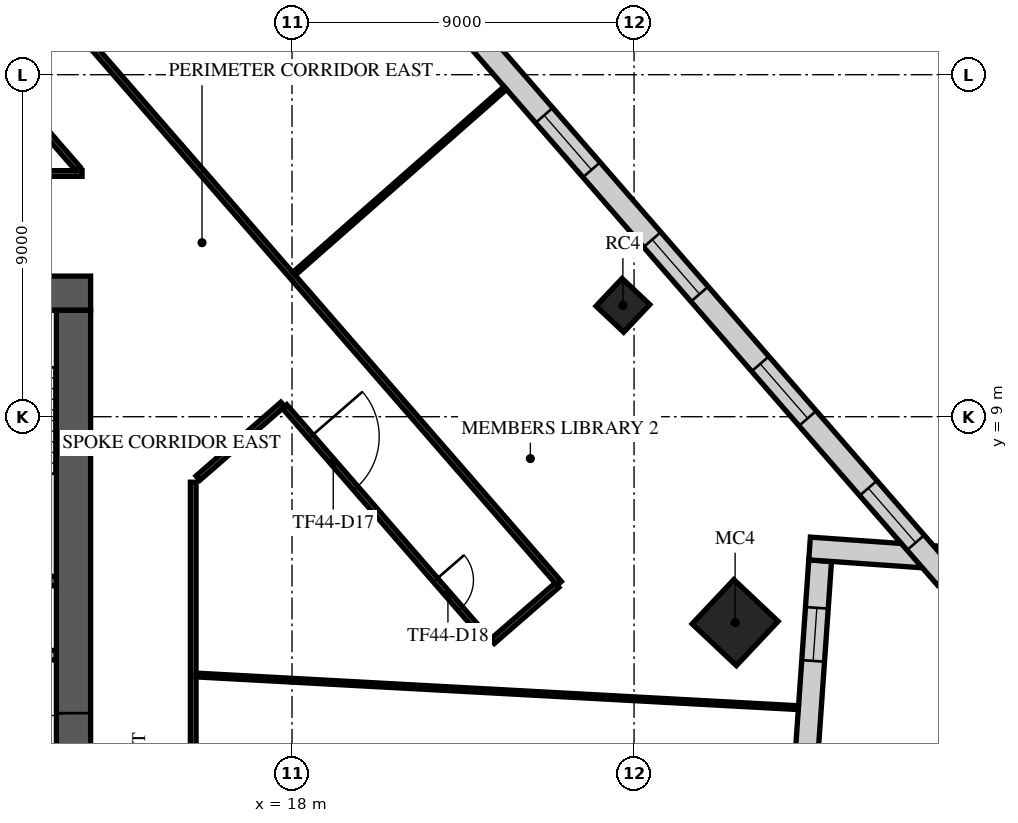
"""IFC4 building model, lengths in metres.
Left out: names, types, materials, properties, quantities, classifications, styles, units other than length and angle.
Written with IfcOpenShell. Run it as: python <this file> out.ifc"""

import sys

from ifc_helpers import new_model, si_unit, direction, frame, frame_2d, origin, origin_2d, place, context, subcontext, project, spatial, rectangle, extrude, element, fill, save


model = new_model("IFC4")
c1 = context("Model", 3, precision=1e-05, world=origin(), true_north=direction((0.0, 1.0)))
c2 = subcontext(c1, "Body", "Model", "MODEL_VIEW")
j1 = project(units=[si_unit("LENGTHUNIT", "METRE"), si_unit("PLANEANGLEUNIT", "RADIAN")], contexts=[c1])
p1 = place(None, origin())
s1 = spatial("IfcSite", under=j1, at=p1, CompositionType="ELEMENT")
p2 = place(p1, origin())
s2 = spatial("IfcBuilding", under=s1, at=p2, CompositionType="ELEMENT")
p3 = place(p2, frame((0.0, 0.0, 189.3)))
s3 = spatial("IfcBuildingStorey", under=s2, at=p3, CompositionType="ELEMENT", Elevation=189.3)
p4 = place(p3, frame((29.659, 3.582, -0.38), z_axis=(0.0, 0.0, 1.0), x_axis=(0.685916152371, 0.727680583715, 0.0)))
e1 = element("IfcColumn", 1, at=p4, inside=s3, PredefinedType="COLUMN", context=c2, shape_type="SweptSolid", body=[
    extrude(rectangle(XDim=1.6, YDim=1.6, at=origin_2d()), origin(), (0.0, 0.0, 1.0), 4.38),
])
p5 = place(p3, frame((26.706, 11.931, -0.38), z_axis=(0.0, 0.0, 1.0), x_axis=(0.685916152371, 0.727680583715, 0.0)))
e2 = element("IfcColumn", 2, at=p5, inside=s3, PredefinedType="COLUMN", context=c2, shape_type="SweptSolid", body=[
    extrude(rectangle(XDim=1.0, YDim=1.0, at=origin_2d()), origin(), (0.0, 0.0, 1.0), 4.38),
])
p6 = place(p3, frame((-12.7, 12.25, 0.0), z_axis=(0.0, 0.0, 1.0), x_axis=(1.0, 0.0, 0.0)))
e3 = element("IfcWall", 3, at=p6, inside=s3, PredefinedType="SHEAR", context=c2, shape_type="SweptSolid", body=[
    extrude(rectangle(XDim=25.4, YDim=0.9, at=frame_2d((12.7, 0.0))), origin(), (0.0, 0.0, 1.0), 3.62),
])
p7 = place(p6, frame((11.5, 0.0, 0.0)))
e4 = element("IfcOpeningElement", 4, at=p7, cuts=e3, PredefinedType="OPENING", context=c2, shape_type="SweptSolid", body=[
    extrude(rectangle(XDim=2.4, YDim=2.4, at=frame_2d((1.2, 1.2))), frame((0.0, 0.46, 0.0), z_axis=(0.0, -1.0, 0.0), x_axis=(1.0, 0.0, 0.0)), (0.0, 0.0, 1.0), 0.92),
])
p8 = place(p6, frame((22.325, 0.0, 0.0)))
e5 = element("IfcOpeningElement", 5, at=p8, cuts=e3, PredefinedType="OPENING", context=c2, shape_type="SweptSolid", body=[
    extrude(rectangle(XDim=1.2, YDim=2.1, at=frame_2d((0.6, 1.05))), frame((0.0, 0.46, 0.0), z_axis=(0.0, -1.0, 0.0), x_axis=(1.0, 0.0, 0.0)), (0.0, 0.0, 1.0), 0.92),
])
p9 = place(p6, frame((1.3, 0.0, 0.0)))
e6 = element("IfcOpeningElement", 6, at=p9, cuts=e3, PredefinedType="OPENING", context=c2, shape_type="SweptSolid", body=[
    extrude(rectangle(XDim=1.0, YDim=2.1, at=frame_2d((0.5, 1.05))), frame((0.0, 0.46, 0.0), z_axis=(0.0, -1.0, 0.0), x_axis=(1.0, 0.0, 0.0)), (0.0, 0.0, 1.0), 0.92),
])
p10 = place(p3, frame((12.25, -11.8, 0.0), z_axis=(0.0, 0.0, 1.0), x_axis=(0.0, 1.0, 0.0)))
e7 = element("IfcWall", 7, at=p10, inside=s3, PredefinedType="SHEAR", context=c2, shape_type="SweptSolid", body=[
    extrude(rectangle(XDim=23.6, YDim=0.9, at=frame_2d((11.8, 0.0))), origin(), (0.0, 0.0, 1.0), 3.62),
])
p11 = place(p10, frame((10.6, 0.0, 0.0)))
e8 = element("IfcOpeningElement", 8, at=p11, cuts=e7, PredefinedType="OPENING", context=c2, shape_type="SweptSolid", body=[
    extrude(rectangle(XDim=2.4, YDim=2.4, at=frame_2d((1.2, 1.2))), frame((0.0, 0.46, 0.0), z_axis=(0.0, -1.0, 0.0), x_axis=(1.0, 0.0, 0.0)), (0.0, 0.0, 1.0), 0.92),
])
p12 = place(p3, frame((8.65, 4.675, 0.0), z_axis=(0.0, 0.0, 1.0), x_axis=(1.0, 0.0, 0.0)))
e9 = element("IfcWall", 9, at=p12, inside=s3, PredefinedType="SOLIDWALL", context=c2, shape_type="SweptSolid", body=[
    extrude(rectangle(XDim=3.15, YDim=0.25, at=frame_2d((1.575, 0.0))), origin(), (0.0, 0.0, 1.0), 3.62),
])
p13 = place(p3, frame((8.38, 2.725, 0.0), z_axis=(0.0, 0.0, 1.0), x_axis=(1.0, 0.0, 0.0)))
e10 = element("IfcWall", 10, at=p13, inside=s3, PredefinedType="PARTITIONING", context=c2, shape_type="SweptSolid", body=[
    extrude(rectangle(XDim=3.415, YDim=0.25, at=frame_2d((1.708, 0.0))), origin(), (0.0, 0.0, 1.0), 3.62),
])
p14 = place(p13, frame((1.17, 0.0, 0.0)))
e11 = element("IfcOpeningElement", 11, at=p14, cuts=e10, PredefinedType="OPENING", context=c2, shape_type="SweptSolid", body=[
    extrude(rectangle(XDim=0.9, YDim=2.1, at=frame_2d((0.45, 1.05))), frame((0.0, 0.135, 0.0), z_axis=(0.0, -1.0, 0.0), x_axis=(1.0, 0.0, 0.0)), (0.0, 0.0, 1.0), 0.27),
])
p15 = place(p3, frame((31.354, -2.547, 0.0), z_axis=(0.0, 0.0, 1.0), x_axis=(0.069743544409, 0.997564954283, 0.0)))
e12 = element("IfcWall", 12, at=p15, inside=s3, PredefinedType="STANDARD", context=c2, shape_type="SweptSolid", body=[
    extrude(rectangle(XDim=7.778, YDim=0.6, at=frame_2d((3.889, 0.0))), origin(), (0.0, 0.0, 1.0), 3.62),
])
p16 = place(p15, frame((1.244, 0.0, 0.9)))
e13 = element("IfcOpeningElement", 13, at=p16, cuts=e12, PredefinedType="OPENING", context=c2, shape_type="SweptSolid", body=[
    extrude(rectangle(XDim=1.4, YDim=2.1, at=frame_2d((0.7, 1.05))), frame((0.0, 0.31, 0.0), z_axis=(0.0, -1.0, 0.0), x_axis=(1.0, 0.0, 0.0)), (0.0, 0.0, 1.0), 0.62),
])
p17 = place(p15, frame((5.134, 0.0, 0.9)))
e14 = element("IfcOpeningElement", 14, at=p17, cuts=e12, PredefinedType="OPENING", context=c2, shape_type="SweptSolid", body=[
    extrude(rectangle(XDim=1.4, YDim=2.1, at=frame_2d((0.7, 1.05))), frame((0.0, 0.31, 0.0), z_axis=(0.0, -1.0, 0.0), x_axis=(1.0, 0.0, 0.0)), (0.0, 0.0, 1.0), 0.62),
])
p18 = place(p3, frame((31.618, 5.532, 0.0), z_axis=(0.0, 0.0, 1.0), x_axis=(0.997563916762, -0.069758382828, 0.0)))
e15 = element("IfcWall", 15, at=p18, inside=s3, PredefinedType="STANDARD", context=c2, shape_type="SweptSolid", body=[
    extrude(rectangle(XDim=3.846, YDim=0.6, at=frame_2d((1.923, 0.0))), origin(), (0.0, 0.0, 1.0), 3.62),
])
p19 = place(p3, frame((35.208, 4.768, 0.0), z_axis=(0.0, 0.0, 1.0), x_axis=(-0.656058749455, 0.754709823219, 0.0)))
e16 = element("IfcWall", 16, at=p19, inside=s3, PredefinedType="STANDARD", context=c2, shape_type="SweptSolid", body=[
    extrude(rectangle(XDim=39.0, YDim=0.6, at=frame_2d((19.5, 0.0))), origin(), (0.0, 0.0, 1.0), 3.62),
])
p20 = place(p19, frame((1.217, 0.0, 0.9)))
e17 = element("IfcOpeningElement", 17, at=p20, cuts=e16, PredefinedType="OPENING", context=c2, shape_type="SweptSolid", body=[
    extrude(rectangle(XDim=1.9, YDim=2.1, at=frame_2d((0.95, 1.05))), frame((0.0, 0.31, 0.0), z_axis=(0.0, -1.0, 0.0), x_axis=(1.0, 0.0, 0.0)), (0.0, 0.0, 1.0), 0.62),
])
p21 = place(p19, frame((5.55, 0.0, 0.9)))
e18 = element("IfcOpeningElement", 18, at=p21, cuts=e16, PredefinedType="OPENING", context=c2, shape_type="SweptSolid", body=[
    extrude(rectangle(XDim=1.9, YDim=2.1, at=frame_2d((0.95, 1.05))), frame((0.0, 0.31, 0.0), z_axis=(0.0, -1.0, 0.0), x_axis=(1.0, 0.0, 0.0)), (0.0, 0.0, 1.0), 0.62),
])
p22 = place(p19, frame((9.883, 0.0, 0.9)))
e19 = element("IfcOpeningElement", 19, at=p22, cuts=e16, PredefinedType="OPENING", context=c2, shape_type="SweptSolid", body=[
    extrude(rectangle(XDim=1.9, YDim=2.1, at=frame_2d((0.95, 1.05))), frame((0.0, 0.31, 0.0), z_axis=(0.0, -1.0, 0.0), x_axis=(1.0, 0.0, 0.0)), (0.0, 0.0, 1.0), 0.62),
])
p23 = place(p19, frame((14.217, 0.0, 0.9)))
e20 = element("IfcOpeningElement", 20, at=p23, cuts=e16, PredefinedType="OPENING", context=c2, shape_type="SweptSolid", body=[
    extrude(rectangle(XDim=1.9, YDim=2.1, at=frame_2d((0.95, 1.05))), frame((0.0, 0.31, 0.0), z_axis=(0.0, -1.0, 0.0), x_axis=(1.0, 0.0, 0.0)), (0.0, 0.0, 1.0), 0.62),
])
p24 = place(p19, frame((18.55, 0.0, 0.9)))
e21 = element("IfcOpeningElement", 21, at=p24, cuts=e16, PredefinedType="OPENING", context=c2, shape_type="SweptSolid", body=[
    extrude(rectangle(XDim=1.9, YDim=2.1, at=frame_2d((0.95, 1.05))), frame((0.0, 0.31, 0.0), z_axis=(0.0, -1.0, 0.0), x_axis=(1.0, 0.0, 0.0)), (0.0, 0.0, 1.0), 0.62),
])
p25 = place(p19, frame((22.883, 0.0, 0.9)))
e22 = element("IfcOpeningElement", 22, at=p25, cuts=e16, PredefinedType="OPENING", context=c2, shape_type="SweptSolid", body=[
    extrude(rectangle(XDim=1.9, YDim=2.1, at=frame_2d((0.95, 1.05))), frame((0.0, 0.31, 0.0), z_axis=(0.0, -1.0, 0.0), x_axis=(1.0, 0.0, 0.0)), (0.0, 0.0, 1.0), 0.62),
])
p26 = place(p19, frame((27.217, 0.0, 0.9)))
e23 = element("IfcOpeningElement", 23, at=p26, cuts=e16, PredefinedType="OPENING", context=c2, shape_type="SweptSolid", body=[
    extrude(rectangle(XDim=1.9, YDim=2.1, at=frame_2d((0.95, 1.05))), frame((0.0, 0.31, 0.0), z_axis=(0.0, -1.0, 0.0), x_axis=(1.0, 0.0, 0.0)), (0.0, 0.0, 1.0), 0.62),
])
p27 = place(p19, frame((31.55, 0.0, 0.9)))
e24 = element("IfcOpeningElement", 24, at=p27, cuts=e16, PredefinedType="OPENING", context=c2, shape_type="SweptSolid", body=[
    extrude(rectangle(XDim=1.9, YDim=2.1, at=frame_2d((0.95, 1.05))), frame((0.0, 0.31, 0.0), z_axis=(0.0, -1.0, 0.0), x_axis=(1.0, 0.0, 0.0)), (0.0, 0.0, 1.0), 0.62),
])
p28 = place(p19, frame((35.883, 0.0, 0.9)))
e25 = element("IfcOpeningElement", 25, at=p28, cuts=e16, PredefinedType="OPENING", context=c2, shape_type="SweptSolid", body=[
    extrude(rectangle(XDim=1.9, YDim=2.1, at=frame_2d((0.95, 1.05))), frame((0.0, 0.31, 0.0), z_axis=(0.0, -1.0, 0.0), x_axis=(1.0, 0.0, 0.0)), (0.0, 0.0, 1.0), 0.62),
])
p29 = place(p3, frame((-7.843, 15.4, 0.0), z_axis=(0.0, 0.0, 1.0), x_axis=(1.0, 0.0, 0.0)))
e26 = element("IfcWall", 26, at=p29, inside=s3, PredefinedType="PARTITIONING", context=c2, shape_type="SweptSolid", body=[
    extrude(rectangle(XDim=20.318, YDim=0.15, at=frame_2d((10.159, 0.0))), origin(), (0.0, 0.0, 1.0), 3.17),
])
p30 = place(p29, frame((9.55, 0.0, 0.0)))
e27 = element("IfcOpeningElement", 27, at=p30, cuts=e26, PredefinedType="OPENING", context=c2, shape_type="SweptSolid", body=[
    extrude(rectangle(XDim=1.0, YDim=2.1, at=frame_2d((0.5, 1.05))), frame((0.0, 0.085, 0.0), z_axis=(0.0, -1.0, 0.0), x_axis=(1.0, 0.0, 0.0)), (0.0, 0.0, 1.0), 0.17),
])
p31 = place(p3, frame((6.292, 22.512, 0.0), z_axis=(0.0, 0.0, 1.0), x_axis=(0.656052066859, -0.754715632255, 0.0)))
e28 = element("IfcWall", 28, at=p31, inside=s3, PredefinedType="PARTITIONING", context=c2, shape_type="SweptSolid", body=[
    extrude(rectangle(XDim=9.26, YDim=0.15, at=frame_2d((4.63, 0.0))), origin(), (0.0, 0.0, 1.0), 3.17),
])
p32 = place(p31, frame((3.963, 0.0, 0.0)))
e29 = element("IfcOpeningElement", 29, at=p32, cuts=e28, PredefinedType="OPENING", context=c2, shape_type="SweptSolid", body=[
    extrude(rectangle(XDim=1.0, YDim=2.1, at=frame_2d((0.5, 1.05))), frame((0.0, 0.085, 0.0), z_axis=(0.0, -1.0, 0.0), x_axis=(1.0, 0.0, 0.0)), (0.0, 0.0, 1.0), 0.17),
])
p33 = place(p3, frame((8.103, 24.087, 0.0), z_axis=(0.0, 0.0, 1.0), x_axis=(0.656048444225, -0.754718781289, 0.0)))
e30 = element("IfcWall", 30, at=p33, inside=s3, PredefinedType="PARTITIONING", context=c2, shape_type="SweptSolid", body=[
    extrude(rectangle(XDim=25.8, YDim=0.15, at=frame_2d((12.9, 0.0))), origin(), (0.0, 0.0, 1.0), 3.17),
])
p34 = place(p3, frame((15.4, -8.667, 0.0), z_axis=(0.0, 0.0, 1.0), x_axis=(0.0, 1.0, 0.0)))
e31 = element("IfcWall", 31, at=p34, inside=s3, PredefinedType="PARTITIONING", context=c2, shape_type="SweptSolid", body=[
    extrude(rectangle(XDim=15.944, YDim=0.15, at=frame_2d((7.972, 0.0))), origin(), (0.0, 0.0, 1.0), 3.17),
])
p35 = place(p3, frame((15.524, 7.385, 0.0), z_axis=(0.0, 0.0, 1.0), x_axis=(0.754751247574, 0.656011093111, 0.0)))
e32 = element("IfcWall", 32, at=p35, inside=s3, PredefinedType="PARTITIONING", context=c2, shape_type="SweptSolid", body=[
    extrude(rectangle(XDim=2.957, YDim=0.15, at=frame_2d((1.479, 0.0))), origin(), (0.0, 0.0, 1.0), 3.17),
])
p36 = place(p3, frame((17.805, 9.268, 0.0), z_axis=(0.0, 0.0, 1.0), x_axis=(0.656027059873, -0.754737369364, 0.0)))
e33 = element("IfcWall", 33, at=p36, inside=s3, PredefinedType="PARTITIONING", context=c2, shape_type="SweptSolid", body=[
    extrude(rectangle(XDim=8.251, YDim=0.15, at=frame_2d((4.125, 0.0))), origin(), (0.0, 0.0, 1.0), 3.17),
])
p37 = place(p36, frame((1.05, 0.0, 0.0)))
e34 = element("IfcOpeningElement", 34, at=p37, cuts=e33, PredefinedType="OPENING", context=c2, shape_type="SweptSolid", body=[
    extrude(rectangle(XDim=1.8, YDim=2.1, at=frame_2d((0.9, 1.05))), frame((0.0, 0.085, 0.0), z_axis=(0.0, -1.0, 0.0), x_axis=(1.0, 0.0, 0.0)), (0.0, 0.0, 1.0), 0.17),
])
p38 = place(p36, frame((6.05, 0.0, 0.0)))
e35 = element("IfcOpeningElement", 35, at=p38, cuts=e33, PredefinedType="OPENING", context=c2, shape_type="SweptSolid", body=[
    extrude(rectangle(XDim=1.0, YDim=2.1, at=frame_2d((0.5, 1.05))), frame((0.0, 0.085, 0.0), z_axis=(0.0, -1.0, 0.0), x_axis=(1.0, 0.0, 0.0)), (0.0, 0.0, 1.0), 0.17),
])
p39 = place(p3, frame((23.275, 3.09, 0.0), z_axis=(0.0, 0.0, 1.0), x_axis=(0.754495728819, 0.656304955942, 0.0)))
e36 = element("IfcWall", 36, at=p39, inside=s3, PredefinedType="PARTITIONING", context=c2, shape_type="SweptSolid", body=[
    extrude(rectangle(XDim=2.25, YDim=0.15, at=frame_2d((1.125, 0.0))), origin(), (0.0, 0.0, 1.0), 3.17),
])
p40 = place(p3, frame((15.478, 2.203, 0.0), z_axis=(0.0, 0.0, 1.0), x_axis=(0.998532575908, -0.054154361321, 0.0)))
e37 = element("IfcWall", 37, at=p40, inside=s3, PredefinedType="PARTITIONING", context=c2, shape_type="SweptSolid", body=[
    extrude(rectangle(XDim=15.869, YDim=0.1, at=frame_2d((7.935, 0.0))), origin(), (0.0, 0.0, 1.0), 3.62),
])
p41 = place(p3, frame((18.05, 12.76, 0.0), z_axis=(0.0, 0.0, 1.0), x_axis=(0.751001885152, 0.660300059441, 0.0)))
e38 = element("IfcWall", 38, at=p41, inside=s3, PredefinedType="PARTITIONING", context=c2, shape_type="SweptSolid", body=[
    extrude(rectangle(XDim=7.405, YDim=0.1, at=frame_2d((3.702, 0.0))), origin(), (0.0, 0.0, 1.0), 3.17),
])
p42 = place(p11, origin())
e39 = element("IfcDoor", 39, at=p42, inside=s3, OperationType="SINGLE_SWING_LEFT", PredefinedType="DOOR", context=c2, shape_type="SweptSolid", body=[
    extrude(rectangle(XDim=2.4, YDim=2.4, at=frame_2d((1.2, 1.2))), frame((0.0, 0.025, 0.0), z_axis=(0.0, -1.0, 0.0), x_axis=(1.0, 0.0, 0.0)), (0.0, 0.0, 1.0), 0.05),
])
fill(e8, e39)
p43 = place(p17, origin())
e40 = element("IfcWindow", 40, at=p43, inside=s3, PartitioningType="SINGLE_PANEL", PredefinedType="WINDOW", context=c2, shape_type="SweptSolid", body=[
    extrude(rectangle(XDim=1.4, YDim=2.1, at=frame_2d((0.7, 1.05))), frame((0.0, 0.03, 0.0), z_axis=(0.0, -1.0, 0.0), x_axis=(1.0, 0.0, 0.0)), (0.0, 0.0, 1.0), 0.06),
])
fill(e14, e40)
p44 = place(p20, origin())
e41 = element("IfcWindow", 41, at=p44, inside=s3, PartitioningType="SINGLE_PANEL", PredefinedType="WINDOW", context=c2, shape_type="SweptSolid", body=[
    extrude(rectangle(XDim=1.9, YDim=2.1, at=frame_2d((0.95, 1.05))), frame((0.0, 0.03, 0.0), z_axis=(0.0, -1.0, 0.0), x_axis=(1.0, 0.0, 0.0)), (0.0, 0.0, 1.0), 0.06),
])
fill(e17, e41)
p45 = place(p21, origin())
e42 = element("IfcWindow", 42, at=p45, inside=s3, PartitioningType="SINGLE_PANEL", PredefinedType="WINDOW", context=c2, shape_type="SweptSolid", body=[
    extrude(rectangle(XDim=1.9, YDim=2.1, at=frame_2d((0.95, 1.05))), frame((0.0, 0.03, 0.0), z_axis=(0.0, -1.0, 0.0), x_axis=(1.0, 0.0, 0.0)), (0.0, 0.0, 1.0), 0.06),
])
fill(e18, e42)
p46 = place(p22, origin())
e43 = element("IfcWindow", 43, at=p46, inside=s3, PartitioningType="SINGLE_PANEL", PredefinedType="WINDOW", context=c2, shape_type="SweptSolid", body=[
    extrude(rectangle(XDim=1.9, YDim=2.1, at=frame_2d((0.95, 1.05))), frame((0.0, 0.03, 0.0), z_axis=(0.0, -1.0, 0.0), x_axis=(1.0, 0.0, 0.0)), (0.0, 0.0, 1.0), 0.06),
])
fill(e19, e43)
p47 = place(p23, origin())
e44 = element("IfcWindow", 44, at=p47, inside=s3, PartitioningType="SINGLE_PANEL", PredefinedType="WINDOW", context=c2, shape_type="SweptSolid", body=[
    extrude(rectangle(XDim=1.9, YDim=2.1, at=frame_2d((0.95, 1.05))), frame((0.0, 0.03, 0.0), z_axis=(0.0, -1.0, 0.0), x_axis=(1.0, 0.0, 0.0)), (0.0, 0.0, 1.0), 0.06),
])
fill(e20, e44)
p48 = place(p37, frame((1.8, 0.0, 0.0), z_axis=(0.0, 0.0, 1.0), x_axis=(-1.0, 0.0, 0.0)))
e45 = element("IfcDoor", 45, at=p48, inside=s3, OperationType="DOUBLE_DOOR_SINGLE_SWING", PredefinedType="DOOR", context=c2, shape_type="SweptSolid", body=[
    extrude(rectangle(XDim=1.8, YDim=2.1, at=frame_2d((0.9, 1.05))), frame((0.0, 0.025, 0.0), z_axis=(0.0, -1.0, 0.0), x_axis=(1.0, 0.0, 0.0)), (0.0, 0.0, 1.0), 0.05),
])
fill(e34, e45)
p49 = place(p38, frame((1.0, 0.0, 0.0), z_axis=(0.0, 0.0, 1.0), x_axis=(-1.0, 0.0, 0.0)))
e46 = element("IfcDoor", 46, at=p49, inside=s3, OperationType="SINGLE_SWING_RIGHT", PredefinedType="DOOR", context=c2, shape_type="SweptSolid", body=[
    extrude(rectangle(XDim=1.0, YDim=2.1, at=frame_2d((0.5, 1.05))), frame((0.0, 0.025, 0.0), z_axis=(0.0, -1.0, 0.0), x_axis=(1.0, 0.0, 0.0)), (0.0, 0.0, 1.0), 0.05),
])
fill(e35, e46)
save(model, sys.argv[1])
